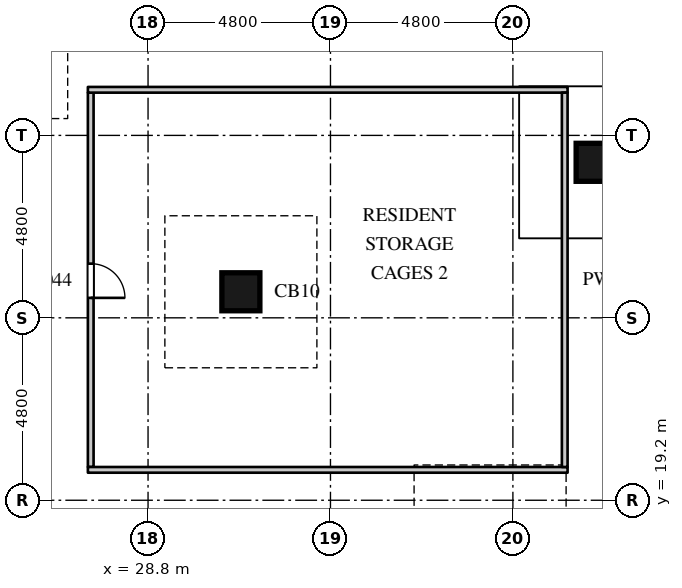
"""IFC4 building model, lengths in metres.
Left out: names, types, materials, properties, quantities, classifications, styles, units other than length and angle.
Written with IfcOpenShell. Run it as: python <this file> out.ifc"""

import sys

from ifc_helpers import new_model, si_unit, direction, frame, frame_2d, origin, origin_2d, place, context, subcontext, project, spatial, polyline, rectangle, outline, extrude, element, fill, save


model = new_model("IFC4")
c1 = context("Model", 3, precision=1e-05, world=origin(), true_north=direction((0.0, 1.0)))
c2 = subcontext(c1, "Body", "Model", "MODEL_VIEW")
j1 = project(units=[si_unit("LENGTHUNIT", "METRE"), si_unit("PLANEANGLEUNIT", "RADIAN")], contexts=[c1])
p1 = place(None, origin())
s1 = spatial("IfcSite", under=j1, at=p1, CompositionType="ELEMENT")
p2 = place(p1, origin())
s2 = spatial("IfcBuilding", under=s1, at=p2, CompositionType="ELEMENT")
p3 = place(p2, frame((0.0, 0.0, -9.0)))
s3 = spatial("IfcBuildingStorey", under=s2, at=p3, CompositionType="ELEMENT", Elevation=-9.0)
p4 = place(p3, origin())
e1 = element("IfcWall", 1, at=p4, inside=s3, PredefinedType="SOLIDWALL", context=c2, shape_type="SweptSolid", body=[
    extrude(outline(polyline([(50.8, 23.513), (23.513, 50.8), (23.264, 50.2), (50.2, 23.264), (50.8, 23.513)])), origin(), (0.0, 0.0, 1.0), 4.5),
])
for number, where, z_axis, x_axis in (
    (2, (31.243, 24.685, 0.0), (0.0, 0.0, 1.0), (1.0, 0.0, 0.0)),
    (3, (40.564, 28.092, 0.0), (0.0, 0.0, 1.0), (1.0, 0.0, 0.0)),
):
    element("IfcColumn", number, at=place(p3, frame(where, z_axis=z_axis, x_axis=x_axis)), inside=s3, PredefinedType="COLUMN", context=c2, shape_type="SweptSolid", body=[
        extrude(rectangle(XDim=1.0, YDim=1.0, at=origin_2d()), origin(), (0.0, 0.0, 1.0), 4.5),
    ])
p5 = place(p3, frame((27.292, 20.075, 0.0), z_axis=(0.0, 0.0, 1.0), x_axis=(0.0, 1.0, 0.0)))
e4 = element("IfcWall", 4, at=p5, inside=s3, PredefinedType="PARTITIONING", context=c2, shape_type="SweptSolid", body=[
    extrude(rectangle(XDim=9.85, YDim=0.15, at=frame_2d((4.925, 0.0))), origin(), (0.0, 0.0, 1.0), 4.048),
])
p6 = place(p5, frame((4.45, 0.0, 0.0)))
e5 = element("IfcOpeningElement", 5, at=p6, cuts=e4, PredefinedType="OPENING", context=c2, shape_type="SweptSolid", body=[
    extrude(rectangle(XDim=0.9, YDim=2.2, at=frame_2d((0.45, 1.1))), frame((0.0, 0.085, 0.0), z_axis=(0.0, -1.0, 0.0), x_axis=(1.0, 0.0, 0.0)), (0.0, 0.0, 1.0), 0.17),
])
for number, where, z_axis, x_axis in (
    (6, (27.217, 20.0, 0.0), (0.0, 0.0, 1.0), (1.0, 0.0, 0.0)),
    (7, (27.217, 30.0, 0.0), (0.0, 0.0, 1.0), (1.0, 0.0, 0.0)),
):
    element("IfcWall", number, at=place(p3, frame(where, z_axis=z_axis, x_axis=x_axis)), inside=s3, PredefinedType="PARTITIONING", context=c2, shape_type="SweptSolid", body=[
        extrude(rectangle(XDim=12.622, YDim=0.15, at=frame_2d((6.311, 0.0))), origin(), (0.0, 0.0, 1.0), 4.048),
    ])
p7 = place(p3, frame((39.764, 20.075, 0.0), z_axis=(0.0, 0.0, 1.0), x_axis=(0.0, 1.0, 0.0)))
e8 = element("IfcWall", 8, at=p7, inside=s3, PredefinedType="PARTITIONING", context=c2, shape_type="SweptSolid", body=[
    extrude(rectangle(XDim=9.85, YDim=0.15, at=frame_2d((4.925, 0.0))), origin(), (0.0, 0.0, 1.0), 4.048),
])
p8 = place(p6, origin())
e9 = element("IfcDoor", 9, at=p8, inside=s3, OperationType="SINGLE_SWING_RIGHT", PredefinedType="DOOR", context=c2, shape_type="SweptSolid", body=[
    extrude(rectangle(XDim=0.9, YDim=2.2, at=frame_2d((0.45, 1.1))), frame((0.0, 0.025, 0.0), z_axis=(0.0, -1.0, 0.0), x_axis=(1.0, 0.0, 0.0)), (0.0, 0.0, 1.0), 0.05),
])
fill(e5, e9)
save(model, sys.argv[1])
